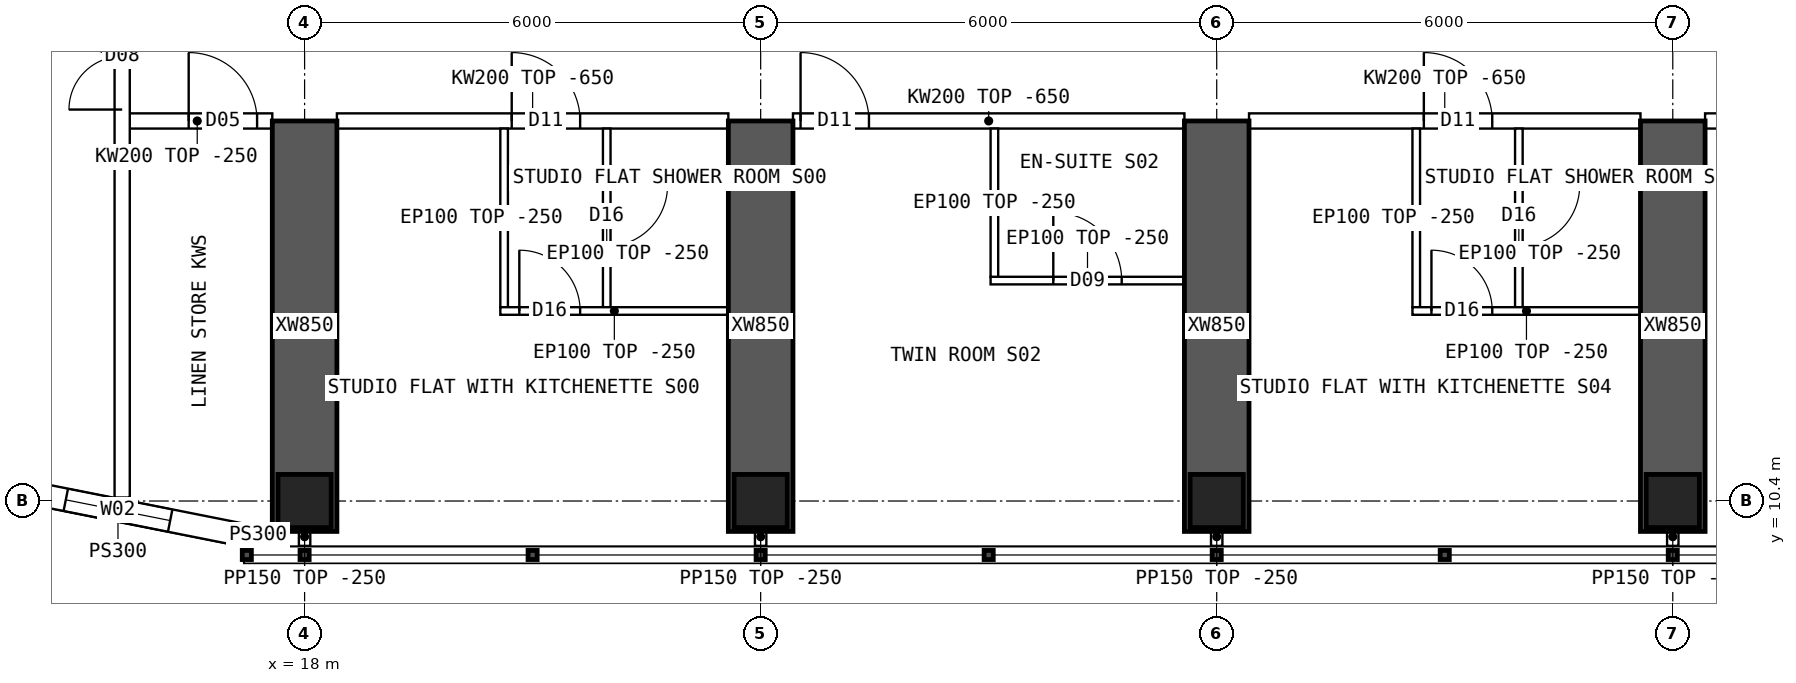
"""IFC4 building model, lengths in metres.
Left out: names, types, materials, properties, quantities, classifications, styles, units other than length and angle.
Written with IfcOpenShell. Run it as: python <this file> out.ifc"""

import sys

from ifc_helpers import new_model, si_unit, direction, frame, frame_2d, origin, origin_2d, place, context, subcontext, project, spatial, polyline, rectangle, hollow_rectangle, outline, extrude, element, fill, save


model = new_model("IFC4")
c1 = context("Model", 3, precision=1e-05, world=origin(), true_north=direction((0.0, 1.0)))
c2 = subcontext(c1, "Body", "Model", "MODEL_VIEW")
j1 = project(units=[si_unit("LENGTHUNIT", "METRE"), si_unit("PLANEANGLEUNIT", "RADIAN")], contexts=[c1])
p1 = place(None, origin())
s1 = spatial("IfcSite", under=j1, at=p1, CompositionType="ELEMENT")
p2 = place(p1, origin())
s2 = spatial("IfcBuilding", under=s1, at=p2, CompositionType="ELEMENT")
p3 = place(p2, frame((0.0, 0.0, 156.1)))
s3 = spatial("IfcBuildingStorey", under=s2, at=p3, CompositionType="ELEMENT", Elevation=156.1)
for number, where, z_axis, x_axis in (
    (1, (18.0, 10.4, 0.0), (0.0, 0.0, 1.0), (1.0, 0.0, 0.0)),
    (2, (24.0, 10.4, 0.0), (0.0, 0.0, 1.0), (1.0, 0.0, 0.0)),
    (3, (30.0, 10.4, 0.0), (0.0, 0.0, 1.0), (1.0, 0.0, 0.0)),
    (4, (36.0, 10.4, 0.0), (0.0, 0.0, 1.0), (1.0, 0.0, 0.0)),
):
    element("IfcColumn", number, at=place(p3, frame(where, z_axis=z_axis, x_axis=x_axis)), inside=s3, PredefinedType="COLUMN", context=c2, shape_type="SweptSolid", body=[
        extrude(hollow_rectangle(XDim=0.7, YDim=0.7, WallThickness=0.07, at=origin_2d()), origin(), (0.0, 0.0, 1.0), 3.75),
    ])
for number, where, z_axis, x_axis in (
    (5, (18.0, 10.0, 0.0), (0.0, 0.0, 1.0), (0.0, 1.0, 0.0)),
    (6, (24.0, 10.0, 0.0), (0.0, 0.0, 1.0), (0.0, 1.0, 0.0)),
    (7, (30.0, 10.0, 0.0), (0.0, 0.0, 1.0), (0.0, 1.0, 0.0)),
    (8, (36.0, 10.0, 0.0), (0.0, 0.0, 1.0), (0.0, 1.0, 0.0)),
):
    element("IfcWall", number, at=place(p3, frame(where, z_axis=z_axis, x_axis=x_axis)), inside=s3, PredefinedType="SHEAR", context=c2, shape_type="SweptSolid", body=[
        extrude(rectangle(XDim=5.4, YDim=0.85, at=frame_2d((2.7, 0.0))), origin(), (0.0, 0.0, 1.0), 3.75),
    ])
p4 = place(p3, frame((13.89, 10.608, 0.0), z_axis=(0.0, 0.0, 1.0), x_axis=(0.98078325777, -0.195100490205, 0.0)))
e9 = element("IfcWall", 9, at=p4, inside=s3, PredefinedType="SOLIDWALL", context=c2, shape_type="SweptSolid", body=[
    extrude(outline(polyline([(-0.03, -0.15), (3.405, -0.15), (3.345, 0.15), (0.03, 0.15), (-0.03, -0.15)])), origin(), (0.0, 0.0, 1.0), 3.5),
])
p5 = place(p4, frame((0.988, 0.0, 0.9)))
e10 = element("IfcOpeningElement", 10, at=p5, cuts=e9, PredefinedType="OPENING", context=c2, shape_type="SweptSolid", body=[
    extrude(rectangle(XDim=1.4, YDim=1.8, at=frame_2d((0.7, 0.9))), frame((0.0, 0.16, 0.0), z_axis=(0.0, -1.0, 0.0), x_axis=(1.0, 0.0, 0.0)), (0.0, 0.0, 1.0), 0.32),
])
p6 = place(p3, frame((17.2, 9.95, 0.0), z_axis=(0.0, 0.0, 1.0), x_axis=(1.0, 0.0, 0.0)))
e11 = element("IfcWall", 11, at=p6, inside=s3, PredefinedType="SOLIDWALL", context=c2, shape_type="SweptSolid", body=[
    extrude(rectangle(XDim=0.375, YDim=0.3, at=frame_2d((0.188, 0.0))), origin(), (0.0, 0.0, 1.0), 3.5),
])
p7 = place(p3, frame((15.6, 15.4, 0.0), z_axis=(0.0, 0.0, 1.0), x_axis=(1.0, 0.0, 0.0)))
e12 = element("IfcWall", 12, at=p7, inside=s3, PredefinedType="SOLIDWALL", context=c2, shape_type="SweptSolid", body=[
    extrude(rectangle(XDim=1.975, YDim=0.2, at=frame_2d((0.987, 0.0))), origin(), (0.0, 0.0, 1.0), 3.5),
])
p8 = place(p7, frame((0.875, 0.0, 0.0)))
e13 = element("IfcOpeningElement", 13, at=p8, cuts=e12, PredefinedType="OPENING", context=c2, shape_type="SweptSolid", body=[
    extrude(rectangle(XDim=0.9, YDim=2.1, at=frame_2d((0.45, 1.05))), frame((0.0, 0.11, 0.0), z_axis=(0.0, -1.0, 0.0), x_axis=(1.0, 0.0, 0.0)), (0.0, 0.0, 1.0), 0.22),
])
p9 = place(p3, frame((18.425, 15.4, 0.0), z_axis=(0.0, 0.0, 1.0), x_axis=(1.0, 0.0, 0.0)))
e14 = element("IfcWall", 14, at=p9, inside=s3, PredefinedType="SOLIDWALL", context=c2, shape_type="SweptSolid", body=[
    extrude(outline(polyline([(0.0, 0.0), (5.15, 0.0), (5.15, 3.1), (0.0, 3.1), (0.0, 0.0)])), frame((0.0, 0.1, 0.0), z_axis=(0.0, -1.0, 0.0), x_axis=(1.0, 0.0, 0.0)), (0.0, 0.0, 1.0), 0.2),
])
p10 = place(p9, frame((2.3, 0.0, 0.0)))
e15 = element("IfcOpeningElement", 15, at=p10, cuts=e14, PredefinedType="OPENING", context=c2, shape_type="SweptSolid", body=[
    extrude(rectangle(XDim=0.9, YDim=2.1, at=frame_2d((0.45, 1.05))), frame((0.0, 0.11, 0.0), z_axis=(0.0, -1.0, 0.0), x_axis=(1.0, 0.0, 0.0)), (0.0, 0.0, 1.0), 0.22),
])
p11 = place(p3, frame((24.425, 15.4, 0.0), z_axis=(0.0, 0.0, 1.0), x_axis=(1.0, 0.0, 0.0)))
e16 = element("IfcWall", 16, at=p11, inside=s3, PredefinedType="SOLIDWALL", context=c2, shape_type="SweptSolid", body=[
    extrude(outline(polyline([(0.0, 0.0), (5.15, 0.0), (5.15, 3.1), (0.0, 3.1), (0.0, 0.0)])), frame((0.0, 0.1, 0.0), z_axis=(0.0, -1.0, 0.0), x_axis=(1.0, 0.0, 0.0)), (0.0, 0.0, 1.0), 0.2),
])
p12 = place(p11, frame((0.1, 0.0, 0.0)))
e17 = element("IfcOpeningElement", 17, at=p12, cuts=e16, PredefinedType="OPENING", context=c2, shape_type="SweptSolid", body=[
    extrude(rectangle(XDim=0.9, YDim=2.1, at=frame_2d((0.45, 1.05))), frame((0.0, 0.11, 0.0), z_axis=(0.0, -1.0, 0.0), x_axis=(1.0, 0.0, 0.0)), (0.0, 0.0, 1.0), 0.22),
])
p13 = place(p3, frame((30.425, 15.4, 0.0), z_axis=(0.0, 0.0, 1.0), x_axis=(1.0, 0.0, 0.0)))
e18 = element("IfcWall", 18, at=p13, inside=s3, PredefinedType="SOLIDWALL", context=c2, shape_type="SweptSolid", body=[
    extrude(outline(polyline([(0.0, 0.0), (5.15, 0.0), (5.15, 3.1), (0.0, 3.1), (0.0, 0.0)])), frame((0.0, 0.1, 0.0), z_axis=(0.0, -1.0, 0.0), x_axis=(1.0, 0.0, 0.0)), (0.0, 0.0, 1.0), 0.2),
])
p14 = place(p13, frame((2.3, 0.0, 0.0)))
e19 = element("IfcOpeningElement", 19, at=p14, cuts=e18, PredefinedType="OPENING", context=c2, shape_type="SweptSolid", body=[
    extrude(rectangle(XDim=0.9, YDim=2.1, at=frame_2d((0.45, 1.05))), frame((0.0, 0.11, 0.0), z_axis=(0.0, -1.0, 0.0), x_axis=(1.0, 0.0, 0.0)), (0.0, 0.0, 1.0), 0.22),
])
p15 = place(p3, frame((36.425, 15.4, 0.0), z_axis=(0.0, 0.0, 1.0), x_axis=(1.0, 0.0, 0.0)))
e20 = element("IfcWall", 20, at=p15, inside=s3, PredefinedType="SOLIDWALL", context=c2, shape_type="SweptSolid", body=[
    extrude(outline(polyline([(0.0, 0.0), (5.15, 0.0), (5.15, 3.1), (0.0, 3.1), (0.0, 0.0)])), frame((0.0, 0.1, 0.0), z_axis=(0.0, -1.0, 0.0), x_axis=(1.0, 0.0, 0.0)), (0.0, 0.0, 1.0), 0.2),
])
p16 = place(p15, frame((0.3, 0.0, 0.0)))
e21 = element("IfcOpeningElement", 21, at=p16, cuts=e20, PredefinedType="OPENING", context=c2, shape_type="SweptSolid", body=[
    extrude(rectangle(XDim=1.0, YDim=2.1, at=frame_2d((0.5, 1.05))), frame((0.0, 0.11, 0.0), z_axis=(0.0, -1.0, 0.0), x_axis=(1.0, 0.0, 0.0)), (0.0, 0.0, 1.0), 0.22),
])
p17 = place(p3, frame((23.575, 12.9, 0.0), z_axis=(0.0, 0.0, 1.0), x_axis=(-1.0, 0.0, 0.0)))
e22 = element("IfcWall", 22, at=p17, inside=s3, PredefinedType="PARTITIONING", context=c2, shape_type="SweptSolid", body=[
    extrude(rectangle(XDim=3.0, YDim=0.1, at=frame_2d((1.5, 0.0))), origin(), (0.0, 0.0, 1.0), 3.5),
])
p18 = place(p17, frame((1.95, 0.0, 0.0)))
e23 = element("IfcOpeningElement", 23, at=p18, cuts=e22, PredefinedType="OPENING", context=c2, shape_type="SweptSolid", body=[
    extrude(rectangle(XDim=0.8, YDim=2.1, at=frame_2d((0.4, 1.05))), frame((0.0, 0.06, 0.0), z_axis=(0.0, -1.0, 0.0), x_axis=(1.0, 0.0, 0.0)), (0.0, 0.0, 1.0), 0.12),
])
p19 = place(p3, frame((20.625, 12.95, 0.0), z_axis=(0.0, 0.0, 1.0), x_axis=(0.0, 1.0, 0.0)))
e24 = element("IfcWall", 24, at=p19, inside=s3, PredefinedType="PARTITIONING", context=c2, shape_type="SweptSolid", body=[
    extrude(outline(polyline([(0.0, 0.0), (2.35, 0.0), (2.35, 3.1), (2.302, 3.1), (2.3, 3.5), (0.0, 3.5), (0.0, 0.0)])), frame((0.0, 0.05, 0.0), z_axis=(0.0, -1.0, 0.0), x_axis=(1.0, 0.0, 0.0)), (0.0, 0.0, 1.0), 0.1),
])
p20 = place(p3, frame((21.975, 12.95, 0.0), z_axis=(0.0, 0.0, 1.0), x_axis=(0.0, 1.0, 0.0)))
e25 = element("IfcWall", 25, at=p20, inside=s3, PredefinedType="PARTITIONING", context=c2, shape_type="SweptSolid", body=[
    extrude(outline(polyline([(0.0, 0.0), (2.35, 0.0), (2.35, 3.1), (2.302, 3.1), (2.3, 3.5), (0.0, 3.5), (0.0, 0.0)])), frame((0.0, 0.05, 0.0), z_axis=(0.0, -1.0, 0.0), x_axis=(1.0, 0.0, 0.0)), (0.0, 0.0, 1.0), 0.1),
])
p21 = place(p20, frame((0.8, 0.0, 0.0)))
e26 = element("IfcOpeningElement", 26, at=p21, cuts=e25, PredefinedType="OPENING", context=c2, shape_type="SweptSolid", body=[
    extrude(rectangle(XDim=0.8, YDim=2.1, at=frame_2d((0.4, 1.05))), frame((0.0, 0.06, 0.0), z_axis=(0.0, -1.0, 0.0), x_axis=(1.0, 0.0, 0.0)), (0.0, 0.0, 1.0), 0.12),
])
p22 = place(p3, frame((29.575, 13.3, 0.0), z_axis=(0.0, 0.0, 1.0), x_axis=(-1.0, 0.0, 0.0)))
e27 = element("IfcWall", 27, at=p22, inside=s3, PredefinedType="PARTITIONING", context=c2, shape_type="SweptSolid", body=[
    extrude(rectangle(XDim=2.55, YDim=0.1, at=frame_2d((1.275, 0.0))), origin(), (0.0, 0.0, 1.0), 3.5),
])
p23 = place(p22, frame((0.825, 0.0, 0.0)))
e28 = element("IfcOpeningElement", 28, at=p23, cuts=e27, PredefinedType="OPENING", context=c2, shape_type="SweptSolid", body=[
    extrude(rectangle(XDim=0.9, YDim=2.1, at=frame_2d((0.45, 1.05))), frame((0.0, 0.06, 0.0), z_axis=(0.0, -1.0, 0.0), x_axis=(1.0, 0.0, 0.0)), (0.0, 0.0, 1.0), 0.12),
])
p24 = place(p3, frame((27.075, 13.35, 0.0), z_axis=(0.0, 0.0, 1.0), x_axis=(0.0, 1.0, 0.0)))
e29 = element("IfcWall", 29, at=p24, inside=s3, PredefinedType="PARTITIONING", context=c2, shape_type="SweptSolid", body=[
    extrude(outline(polyline([(0.0, 0.0), (1.95, 0.0), (1.95, 3.1), (1.902, 3.1), (1.9, 3.5), (0.0, 3.5), (0.0, 0.0)])), frame((0.0, 0.05, 0.0), z_axis=(0.0, -1.0, 0.0), x_axis=(1.0, 0.0, 0.0)), (0.0, 0.0, 1.0), 0.1),
])
p25 = place(p3, frame((35.575, 12.9, 0.0), z_axis=(0.0, 0.0, 1.0), x_axis=(-1.0, 0.0, 0.0)))
e30 = element("IfcWall", 30, at=p25, inside=s3, PredefinedType="PARTITIONING", context=c2, shape_type="SweptSolid", body=[
    extrude(rectangle(XDim=3.0, YDim=0.1, at=frame_2d((1.5, 0.0))), origin(), (0.0, 0.0, 1.0), 3.5),
])
p26 = place(p25, frame((1.95, 0.0, 0.0)))
e31 = element("IfcOpeningElement", 31, at=p26, cuts=e30, PredefinedType="OPENING", context=c2, shape_type="SweptSolid", body=[
    extrude(rectangle(XDim=0.8, YDim=2.1, at=frame_2d((0.4, 1.05))), frame((0.0, 0.06, 0.0), z_axis=(0.0, -1.0, 0.0), x_axis=(1.0, 0.0, 0.0)), (0.0, 0.0, 1.0), 0.12),
])
p27 = place(p3, frame((32.625, 12.95, 0.0), z_axis=(0.0, 0.0, 1.0), x_axis=(0.0, 1.0, 0.0)))
e32 = element("IfcWall", 32, at=p27, inside=s3, PredefinedType="PARTITIONING", context=c2, shape_type="SweptSolid", body=[
    extrude(outline(polyline([(0.0, 0.0), (2.35, 0.0), (2.35, 3.1), (2.302, 3.1), (2.3, 3.5), (0.0, 3.5), (0.0, 0.0)])), frame((0.0, 0.05, 0.0), z_axis=(0.0, -1.0, 0.0), x_axis=(1.0, 0.0, 0.0)), (0.0, 0.0, 1.0), 0.1),
])
p28 = place(p3, frame((33.975, 12.95, 0.0), z_axis=(0.0, 0.0, 1.0), x_axis=(0.0, 1.0, 0.0)))
e33 = element("IfcWall", 33, at=p28, inside=s3, PredefinedType="PARTITIONING", context=c2, shape_type="SweptSolid", body=[
    extrude(outline(polyline([(0.0, 0.0), (2.35, 0.0), (2.35, 3.1), (2.302, 3.1), (2.3, 3.5), (0.0, 3.5), (0.0, 0.0)])), frame((0.0, 0.05, 0.0), z_axis=(0.0, -1.0, 0.0), x_axis=(1.0, 0.0, 0.0)), (0.0, 0.0, 1.0), 0.1),
])
p29 = place(p28, frame((0.8, 0.0, 0.0)))
e34 = element("IfcOpeningElement", 34, at=p29, cuts=e33, PredefinedType="OPENING", context=c2, shape_type="SweptSolid", body=[
    extrude(rectangle(XDim=0.8, YDim=2.1, at=frame_2d((0.4, 1.05))), frame((0.0, 0.06, 0.0), z_axis=(0.0, -1.0, 0.0), x_axis=(1.0, 0.0, 0.0)), (0.0, 0.0, 1.0), 0.12),
])
p30 = place(p3, frame((15.6, 10.446, 0.0), z_axis=(0.0, 0.0, 1.0), x_axis=(0.0, 1.0, 0.0)))
e35 = element("IfcWall", 35, at=p30, inside=s3, PredefinedType="SOLIDWALL", context=c2, shape_type="SweptSolid", body=[
    extrude(rectangle(XDim=43.107, YDim=0.2, at=frame_2d((21.554, 0.0))), origin(), (0.0, 0.0, 1.0), 3.5),
])
p31 = place(p30, frame((13.914, 0.0, 0.0)))
e36 = element("IfcOpeningElement", 36, at=p31, cuts=e35, PredefinedType="OPENING", context=c2, shape_type="SweptSolid", body=[
    extrude(rectangle(XDim=1.2, YDim=2.1, at=frame_2d((0.6, 1.05))), frame((0.0, 0.11, 0.0), z_axis=(0.0, -1.0, 0.0), x_axis=(1.0, 0.0, 0.0)), (0.0, 0.0, 1.0), 0.22),
])
p32 = place(p30, frame((27.994, 0.0, 0.0)))
e37 = element("IfcOpeningElement", 37, at=p32, cuts=e35, PredefinedType="OPENING", context=c2, shape_type="SweptSolid", body=[
    extrude(rectangle(XDim=1.2, YDim=2.1, at=frame_2d((0.6, 1.05))), frame((0.0, 0.11, 0.0), z_axis=(0.0, -1.0, 0.0), x_axis=(1.0, 0.0, 0.0)), (0.0, 0.0, 1.0), 0.22),
])
p33 = place(p30, frame((5.104, 0.0, 0.0)))
e38 = element("IfcOpeningElement", 38, at=p33, cuts=e35, PredefinedType="OPENING", context=c2, shape_type="SweptSolid", body=[
    extrude(rectangle(XDim=1.4, YDim=2.1, at=frame_2d((0.7, 1.05))), frame((0.0, 0.11, 0.0), z_axis=(0.0, -1.0, 0.0), x_axis=(1.0, 0.0, 0.0)), (0.0, 0.0, 1.0), 0.22),
])
p34 = place(p30, frame((36.504, 0.0, 0.0)))
e39 = element("IfcOpeningElement", 39, at=p34, cuts=e35, PredefinedType="OPENING", context=c2, shape_type="SweptSolid", body=[
    extrude(rectangle(XDim=1.4, YDim=2.1, at=frame_2d((0.7, 1.05))), frame((0.0, 0.11, 0.0), z_axis=(0.0, -1.0, 0.0), x_axis=(1.0, 0.0, 0.0)), (0.0, 0.0, 1.0), 0.22),
])
for number, where, z_axis, x_axis in (
    (40, (18.0, 10.05, 0.0), (0.0, 0.0, 1.0), (0.0, -1.0, 0.0)),
    (41, (24.0, 10.05, 0.0), (0.0, 0.0, 1.0), (0.0, -1.0, 0.0)),
    (42, (30.0, 10.05, 0.0), (0.0, 0.0, 1.0), (0.0, -1.0, 0.0)),
    (43, (36.0, 10.05, 0.0), (0.0, 0.0, 1.0), (0.0, -1.0, 0.0)),
):
    element("IfcWall", number, at=place(p3, frame(where, z_axis=z_axis, x_axis=x_axis)), inside=s3, PredefinedType="PARTITIONING", context=c2, shape_type="SweptSolid", body=[
        extrude(rectangle(XDim=0.24, YDim=0.15, at=frame_2d((0.12, 0.0))), origin(), (0.0, 0.0, 1.0), 3.5),
    ])
p35 = place(p5, origin())
e44 = element("IfcWindow", 44, at=p35, inside=s3, PartitioningType="SINGLE_PANEL", PredefinedType="WINDOW", context=c2, shape_type="SweptSolid", body=[
    extrude(rectangle(XDim=1.4, YDim=1.8, at=frame_2d((0.7, 0.9))), frame((0.0, 0.03, 0.0), z_axis=(0.0, -1.0, 0.0), x_axis=(1.0, 0.0, 0.0)), (0.0, 0.0, 1.0), 0.06),
])
fill(e10, e44)
p36 = place(p18, origin())
e45 = element("IfcDoor", 45, at=p36, inside=s3, OperationType="SINGLE_SWING_RIGHT", PredefinedType="DOOR", context=c2, shape_type="SweptSolid", body=[
    extrude(rectangle(XDim=0.8, YDim=2.1, at=frame_2d((0.4, 1.05))), frame((0.0, 0.025, 0.0), z_axis=(0.0, -1.0, 0.0), x_axis=(1.0, 0.0, 0.0)), (0.0, 0.0, 1.0), 0.05),
])
fill(e23, e45)
p37 = place(p21, origin())
e46 = element("IfcDoor", 46, at=p37, inside=s3, OperationType="SINGLE_SWING_RIGHT", PredefinedType="DOOR", context=c2, shape_type="SweptSolid", body=[
    extrude(rectangle(XDim=0.8, YDim=2.1, at=frame_2d((0.4, 1.05))), frame((0.0, 0.025, 0.0), z_axis=(0.0, -1.0, 0.0), x_axis=(1.0, 0.0, 0.0)), (0.0, 0.0, 1.0), 0.05),
])
fill(e26, e46)
p38 = place(p10, origin())
e47 = element("IfcDoor", 47, at=p38, inside=s3, OperationType="SINGLE_SWING_LEFT", PredefinedType="DOOR", context=c2, shape_type="SweptSolid", body=[
    extrude(rectangle(XDim=0.9, YDim=2.1, at=frame_2d((0.45, 1.05))), frame((0.0, 0.025, 0.0), z_axis=(0.0, -1.0, 0.0), x_axis=(1.0, 0.0, 0.0)), (0.0, 0.0, 1.0), 0.05),
])
fill(e15, e47)
p39 = place(p23, origin())
e48 = element("IfcDoor", 48, at=p39, inside=s3, OperationType="SINGLE_SWING_RIGHT", PredefinedType="DOOR", context=c2, shape_type="SweptSolid", body=[
    extrude(rectangle(XDim=0.9, YDim=2.1, at=frame_2d((0.45, 1.05))), frame((0.0, 0.025, 0.0), z_axis=(0.0, -1.0, 0.0), x_axis=(1.0, 0.0, 0.0)), (0.0, 0.0, 1.0), 0.05),
])
fill(e28, e48)
p40 = place(p12, origin())
e49 = element("IfcDoor", 49, at=p40, inside=s3, OperationType="SINGLE_SWING_LEFT", PredefinedType="DOOR", context=c2, shape_type="SweptSolid", body=[
    extrude(rectangle(XDim=0.9, YDim=2.1, at=frame_2d((0.45, 1.05))), frame((0.0, 0.025, 0.0), z_axis=(0.0, -1.0, 0.0), x_axis=(1.0, 0.0, 0.0)), (0.0, 0.0, 1.0), 0.05),
])
fill(e17, e49)
p41 = place(p26, origin())
e50 = element("IfcDoor", 50, at=p41, inside=s3, OperationType="SINGLE_SWING_RIGHT", PredefinedType="DOOR", context=c2, shape_type="SweptSolid", body=[
    extrude(rectangle(XDim=0.8, YDim=2.1, at=frame_2d((0.4, 1.05))), frame((0.0, 0.025, 0.0), z_axis=(0.0, -1.0, 0.0), x_axis=(1.0, 0.0, 0.0)), (0.0, 0.0, 1.0), 0.05),
])
fill(e31, e50)
p42 = place(p29, origin())
e51 = element("IfcDoor", 51, at=p42, inside=s3, OperationType="SINGLE_SWING_RIGHT", PredefinedType="DOOR", context=c2, shape_type="SweptSolid", body=[
    extrude(rectangle(XDim=0.8, YDim=2.1, at=frame_2d((0.4, 1.05))), frame((0.0, 0.025, 0.0), z_axis=(0.0, -1.0, 0.0), x_axis=(1.0, 0.0, 0.0)), (0.0, 0.0, 1.0), 0.05),
])
fill(e34, e51)
p43 = place(p14, origin())
e52 = element("IfcDoor", 52, at=p43, inside=s3, OperationType="SINGLE_SWING_LEFT", PredefinedType="DOOR", context=c2, shape_type="SweptSolid", body=[
    extrude(rectangle(XDim=0.9, YDim=2.1, at=frame_2d((0.45, 1.05))), frame((0.0, 0.025, 0.0), z_axis=(0.0, -1.0, 0.0), x_axis=(1.0, 0.0, 0.0)), (0.0, 0.0, 1.0), 0.05),
])
fill(e19, e52)
p44 = place(p33, origin())
e53 = element("IfcDoor", 53, at=p44, inside=s3, OperationType="DOUBLE_DOOR_SINGLE_SWING", PredefinedType="DOOR", context=c2, shape_type="SweptSolid", body=[
    extrude(rectangle(XDim=1.4, YDim=2.1, at=frame_2d((0.7, 1.05))), frame((0.0, 0.025, 0.0), z_axis=(0.0, -1.0, 0.0), x_axis=(1.0, 0.0, 0.0)), (0.0, 0.0, 1.0), 0.05),
])
fill(e38, e53)
p45 = place(p8, origin())
e54 = element("IfcDoor", 54, at=p45, inside=s3, OperationType="SINGLE_SWING_LEFT", PredefinedType="DOOR", context=c2, shape_type="SweptSolid", body=[
    extrude(rectangle(XDim=0.9, YDim=2.1, at=frame_2d((0.45, 1.05))), frame((0.0, 0.025, 0.0), z_axis=(0.0, -1.0, 0.0), x_axis=(1.0, 0.0, 0.0)), (0.0, 0.0, 1.0), 0.05),
])
fill(e13, e54)
save(model, sys.argv[1])
